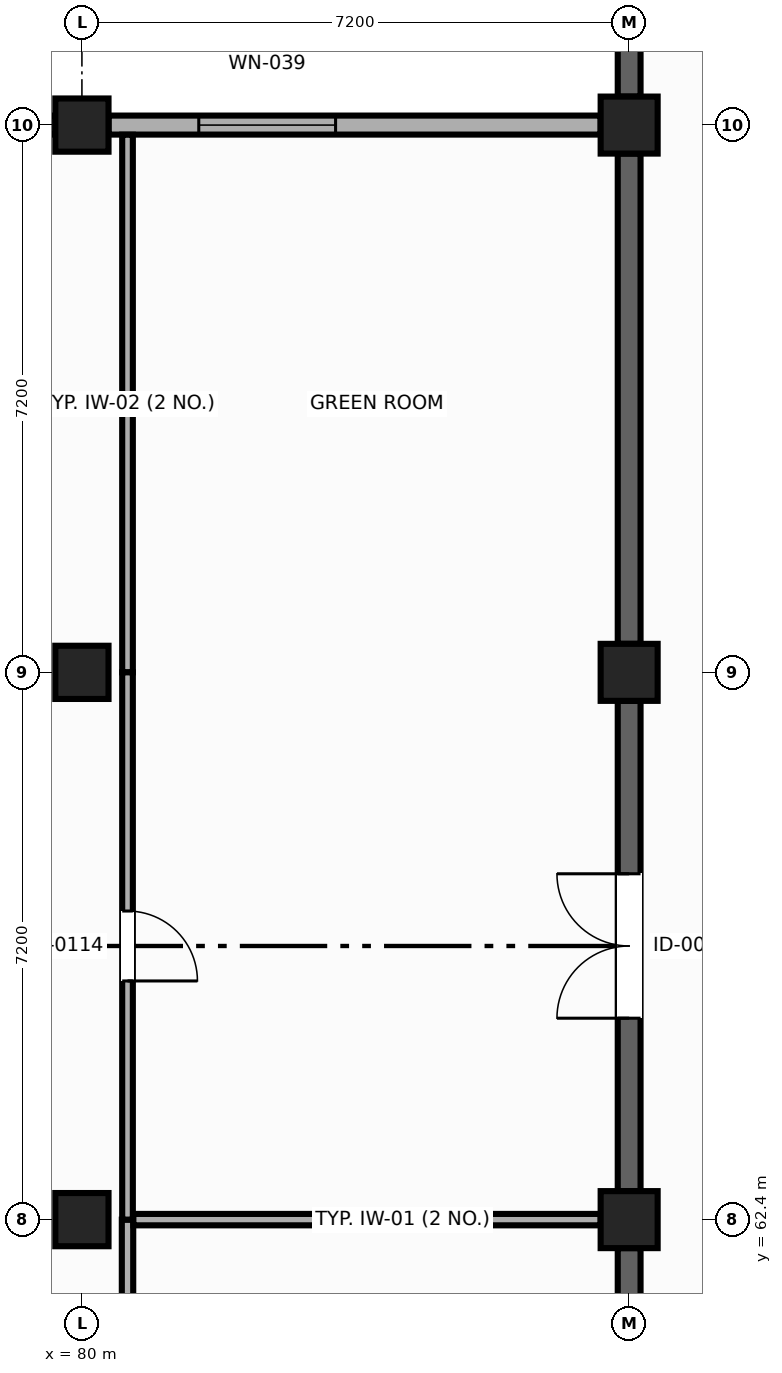
"""IFC4 building model, lengths in metres.
Left out: names, types, materials, properties, quantities, classifications, styles, units other than length and angle.
Written with IfcOpenShell. Run it as: python <this file> out.ifc"""

import sys

from ifc_helpers import new_model, si_unit, direction, frame, frame_2d, origin, origin_2d, place, context, subcontext, project, spatial, rectangle, extrude, element, fill, save


model = new_model("IFC4")
c1 = context("Model", 3, precision=1e-05, world=origin(), true_north=direction((0.0, 1.0)))
c2 = subcontext(c1, "Body", "Model", "MODEL_VIEW")
j1 = project(units=[si_unit("LENGTHUNIT", "METRE"), si_unit("PLANEANGLEUNIT", "RADIAN")], contexts=[c1])
p1 = place(None, origin())
s1 = spatial("IfcSite", under=j1, at=p1, CompositionType="ELEMENT")
p2 = place(p1, origin())
s2 = spatial("IfcBuilding", under=s1, at=p2, CompositionType="ELEMENT")
p3 = place(p2, origin())
s3 = spatial("IfcBuildingStorey", under=s2, at=p3, CompositionType="ELEMENT", Elevation=0.0)
p4 = place(p3, frame((80.0, 62.4, 0.0), z_axis=(0.0, 0.0, 1.0), x_axis=(1.0, 0.0, 0.0)))
e1 = element("IfcColumn", 1, at=p4, inside=s3, PredefinedType="COLUMN", context=c2, shape_type="SweptSolid", body=[
    extrude(rectangle(XDim=0.7, YDim=0.7, at=origin_2d()), origin(), (0.0, 0.0, 1.0), 5.4),
])
p5 = place(p3, frame((87.2, 62.4, 0.0), z_axis=(0.0, 0.0, 1.0), x_axis=(0.0, 1.0, 0.0)))
e2 = element("IfcColumn", 2, at=p5, inside=s3, PredefinedType="COLUMN", context=c2, shape_type="SweptSolid", body=[
    extrude(rectangle(XDim=0.75, YDim=0.75, at=origin_2d()), origin(), (0.0, 0.0, 1.0), 5.4),
])
p6 = place(p3, frame((80.0, 69.6, 0.0), z_axis=(0.0, 0.0, 1.0), x_axis=(0.0, 1.0, 0.0)))
e3 = element("IfcColumn", 3, at=p6, inside=s3, PredefinedType="COLUMN", context=c2, shape_type="SweptSolid", body=[
    extrude(rectangle(XDim=0.7, YDim=0.7, at=origin_2d()), origin(), (0.0, 0.0, 1.0), 5.4),
])
p7 = place(p3, frame((87.2, 69.6, 0.0), z_axis=(0.0, 0.0, 1.0), x_axis=(1.0, 0.0, 0.0)))
e4 = element("IfcColumn", 4, at=p7, inside=s3, PredefinedType="COLUMN", context=c2, shape_type="SweptSolid", body=[
    extrude(rectangle(XDim=0.75, YDim=0.75, at=origin_2d()), origin(), (0.0, 0.0, 1.0), 5.4),
])
p8 = place(p3, frame((80.0, 76.8, 0.0), z_axis=(0.0, 0.0, 1.0), x_axis=(1.0, 0.0, 0.0)))
e5 = element("IfcColumn", 5, at=p8, inside=s3, PredefinedType="COLUMN", context=c2, shape_type="SweptSolid", body=[
    extrude(rectangle(XDim=0.7, YDim=0.7, at=origin_2d()), origin(), (0.0, 0.0, 1.0), 5.4),
])
p9 = place(p3, frame((87.2, 76.8, 0.0), z_axis=(0.0, 0.0, 1.0), x_axis=(1.0, 0.0, 0.0)))
e6 = element("IfcColumn", 6, at=p9, inside=s3, PredefinedType="COLUMN", context=c2, shape_type="SweptSolid", body=[
    extrude(rectangle(XDim=0.75, YDim=0.75, at=origin_2d()), origin(), (0.0, 0.0, 1.0), 5.4),
])
p10 = place(p3, frame((73.15, 76.8, 0.0), z_axis=(0.0, 0.0, 1.0), x_axis=(1.0, 0.0, 0.0)))
e7 = element("IfcWall", 7, at=p10, inside=s3, PredefinedType="SOLIDWALL", context=c2, shape_type="SweptSolid", body=[
    extrude(rectangle(XDim=6.5, YDim=0.25, at=frame_2d((3.25, 0.0))), origin(), (0.0, 0.0, 1.0), 4.315),
])
p11 = place(p10, frame((1.75, 0.0, 0.9)))
e8 = element("IfcOpeningElement", 8, at=p11, cuts=e7, PredefinedType="OPENING", context=c2, shape_type="SweptSolid", body=[
    extrude(rectangle(XDim=3.0, YDim=2.1, at=frame_2d((1.5, 1.05))), frame((0.0, 0.135, 0.0), z_axis=(0.0, -1.0, 0.0), x_axis=(1.0, 0.0, 0.0)), (0.0, 0.0, 1.0), 0.27),
])
p12 = place(p3, frame((80.35, 76.8, 0.0), z_axis=(0.0, 0.0, 1.0), x_axis=(1.0, 0.0, 0.0)))
e9 = element("IfcWall", 9, at=p12, inside=s3, PredefinedType="SOLIDWALL", context=c2, shape_type="SweptSolid", body=[
    extrude(rectangle(XDim=6.475, YDim=0.25, at=frame_2d((3.237, 0.0))), origin(), (0.0, 0.0, 1.0), 4.315),
])
p13 = place(p12, frame((1.188, 0.0, 1.8)))
e10 = element("IfcOpeningElement", 10, at=p13, cuts=e9, PredefinedType="OPENING", context=c2, shape_type="SweptSolid", body=[
    extrude(rectangle(XDim=1.8, YDim=1.2, at=frame_2d((0.9, 0.6))), frame((0.0, 0.135, 0.0), z_axis=(0.0, -1.0, 0.0), x_axis=(1.0, 0.0, 0.0)), (0.0, 0.0, 1.0), 0.27),
])
p14 = place(p3, frame((87.2, 55.575, 0.0), z_axis=(0.0, 0.0, 1.0), x_axis=(0.0, 1.0, 0.0)))
e11 = element("IfcWall", 11, at=p14, inside=s3, PredefinedType="SHEAR", context=c2, shape_type="SweptSolid", body=[
    extrude(rectangle(XDim=6.45, YDim=0.3, at=frame_2d((3.225, 0.0))), origin(), (0.0, 0.0, 1.0), 5.1),
])
p15 = place(p3, frame((87.2, 62.775, 0.0), z_axis=(0.0, 0.0, 1.0), x_axis=(0.0, 1.0, 0.0)))
e12 = element("IfcWall", 12, at=p15, inside=s3, PredefinedType="SHEAR", context=c2, shape_type="SweptSolid", body=[
    extrude(rectangle(XDim=6.45, YDim=0.3, at=frame_2d((3.225, 0.0))), origin(), (0.0, 0.0, 1.0), 5.1),
])
p16 = place(p15, frame((2.275, 0.0, 0.0)))
e13 = element("IfcOpeningElement", 13, at=p16, cuts=e12, PredefinedType="OPENING", context=c2, shape_type="SweptSolid", body=[
    extrude(rectangle(XDim=1.9, YDim=2.35, at=frame_2d((0.95, 1.175))), frame((0.0, 0.16, 0.0), z_axis=(0.0, -1.0, 0.0), x_axis=(1.0, 0.0, 0.0)), (0.0, 0.0, 1.0), 0.32),
])
p17 = place(p3, frame((87.2, 69.975, 0.0), z_axis=(0.0, 0.0, 1.0), x_axis=(0.0, 1.0, 0.0)))
e14 = element("IfcWall", 14, at=p17, inside=s3, PredefinedType="SHEAR", context=c2, shape_type="SweptSolid", body=[
    extrude(rectangle(XDim=6.45, YDim=0.3, at=frame_2d((3.225, 0.0))), origin(), (0.0, 0.0, 1.0), 5.1),
])
p18 = place(p3, frame((87.2, 77.175, 0.0), z_axis=(0.0, 0.0, 1.0), x_axis=(0.0, 1.0, 0.0)))
e15 = element("IfcWall", 15, at=p18, inside=s3, PredefinedType="SHEAR", context=c2, shape_type="SweptSolid", body=[
    extrude(rectangle(XDim=6.639, YDim=0.3, at=frame_2d((3.319, 0.0))), origin(), (0.0, 0.0, 1.0), 5.1),
])
p19 = place(p3, frame((80.6, 58.452, 0.0), z_axis=(0.0, 0.0, 1.0), x_axis=(0.0, 1.0, 0.0)))
e16 = element("IfcWall", 16, at=p19, inside=s3, PredefinedType="PARTITIONING", context=c2, shape_type="SweptSolid", body=[
    extrude(rectangle(XDim=3.948, YDim=0.15, at=frame_2d((1.974, 0.0))), origin(), (0.0, 0.0, 1.0), 4.315),
])
p20 = place(p19, frame((1.424, 0.0, 0.0)))
e17 = element("IfcOpeningElement", 17, at=p20, cuts=e16, PredefinedType="OPENING", context=c2, shape_type="SweptSolid", body=[
    extrude(rectangle(XDim=1.1, YDim=2.15, at=frame_2d((0.55, 1.075))), frame((0.0, 0.085, 0.0), z_axis=(0.0, -1.0, 0.0), x_axis=(1.0, 0.0, 0.0)), (0.0, 0.0, 1.0), 0.17),
])
p21 = place(p3, frame((80.677, 62.4, 0.0), z_axis=(0.0, 0.0, 1.0), x_axis=(1.0, 0.0, 0.0)))
e18 = element("IfcWall", 18, at=p21, inside=s3, PredefinedType="PARTITIONING", context=c2, shape_type="SweptSolid", body=[
    extrude(rectangle(XDim=6.148, YDim=0.15, at=frame_2d((3.074, 0.0))), origin(), (0.0, 0.0, 1.0), 4.315),
])
p22 = place(p3, frame((80.6, 76.673, 0.0), z_axis=(0.0, 0.0, 1.0), x_axis=(0.0, -1.0, 0.0)))
e19 = element("IfcWall", 19, at=p22, inside=s3, PredefinedType="PARTITIONING", context=c2, shape_type="SweptSolid", body=[
    extrude(rectangle(XDim=7.073, YDim=0.14, at=frame_2d((3.537, 0.0))), origin(), (0.0, 0.0, 1.0), 4.315),
])
p23 = place(p3, frame((80.6, 69.6, 0.0), z_axis=(0.0, 0.0, 1.0), x_axis=(0.0, -1.0, 0.0)))
e20 = element("IfcWall", 20, at=p23, inside=s3, PredefinedType="PARTITIONING", context=c2, shape_type="SweptSolid", body=[
    extrude(rectangle(XDim=7.2, YDim=0.14, at=frame_2d((3.6, 0.0))), origin(), (0.0, 0.0, 1.0), 4.315),
])
p24 = place(p23, frame((3.14, 0.0, 0.0)))
e21 = element("IfcOpeningElement", 21, at=p24, cuts=e20, PredefinedType="OPENING", context=c2, shape_type="SweptSolid", body=[
    extrude(rectangle(XDim=0.92, YDim=2.1, at=frame_2d((0.46, 1.05))), frame((0.0, 0.08, 0.0), z_axis=(0.0, -1.0, 0.0), x_axis=(1.0, 0.0, 0.0)), (0.0, 0.0, 1.0), 0.16),
])
p25 = place(p13, origin())
e22 = element("IfcWindow", 22, at=p25, inside=s3, PartitioningType="SINGLE_PANEL", PredefinedType="WINDOW", context=c2, shape_type="SweptSolid", body=[
    extrude(rectangle(XDim=1.8, YDim=1.2, at=frame_2d((0.9, 0.6))), frame((0.0, 0.03, 0.0), z_axis=(0.0, -1.0, 0.0), x_axis=(1.0, 0.0, 0.0)), (0.0, 0.0, 1.0), 0.06),
])
fill(e10, e22)
p26 = place(p16, origin())
e23 = element("IfcDoor", 23, at=p26, inside=s3, OperationType="DOUBLE_DOOR_SINGLE_SWING", PredefinedType="DOOR", context=c2, shape_type="SweptSolid", body=[
    extrude(rectangle(XDim=1.9, YDim=2.35, at=frame_2d((0.95, 1.175))), frame((0.0, 0.025, 0.0), z_axis=(0.0, -1.0, 0.0), x_axis=(1.0, 0.0, 0.0)), (0.0, 0.0, 1.0), 0.05),
])
fill(e13, e23)
p27 = place(p24, origin())
e24 = element("IfcDoor", 24, at=p27, inside=s3, OperationType="SINGLE_SWING_RIGHT", PredefinedType="DOOR", context=c2, shape_type="SweptSolid", body=[
    extrude(rectangle(XDim=0.92, YDim=2.1, at=frame_2d((0.46, 1.05))), frame((0.0, 0.025, 0.0), z_axis=(0.0, -1.0, 0.0), x_axis=(1.0, 0.0, 0.0)), (0.0, 0.0, 1.0), 0.05),
])
fill(e21, e24)
save(model, sys.argv[1])
